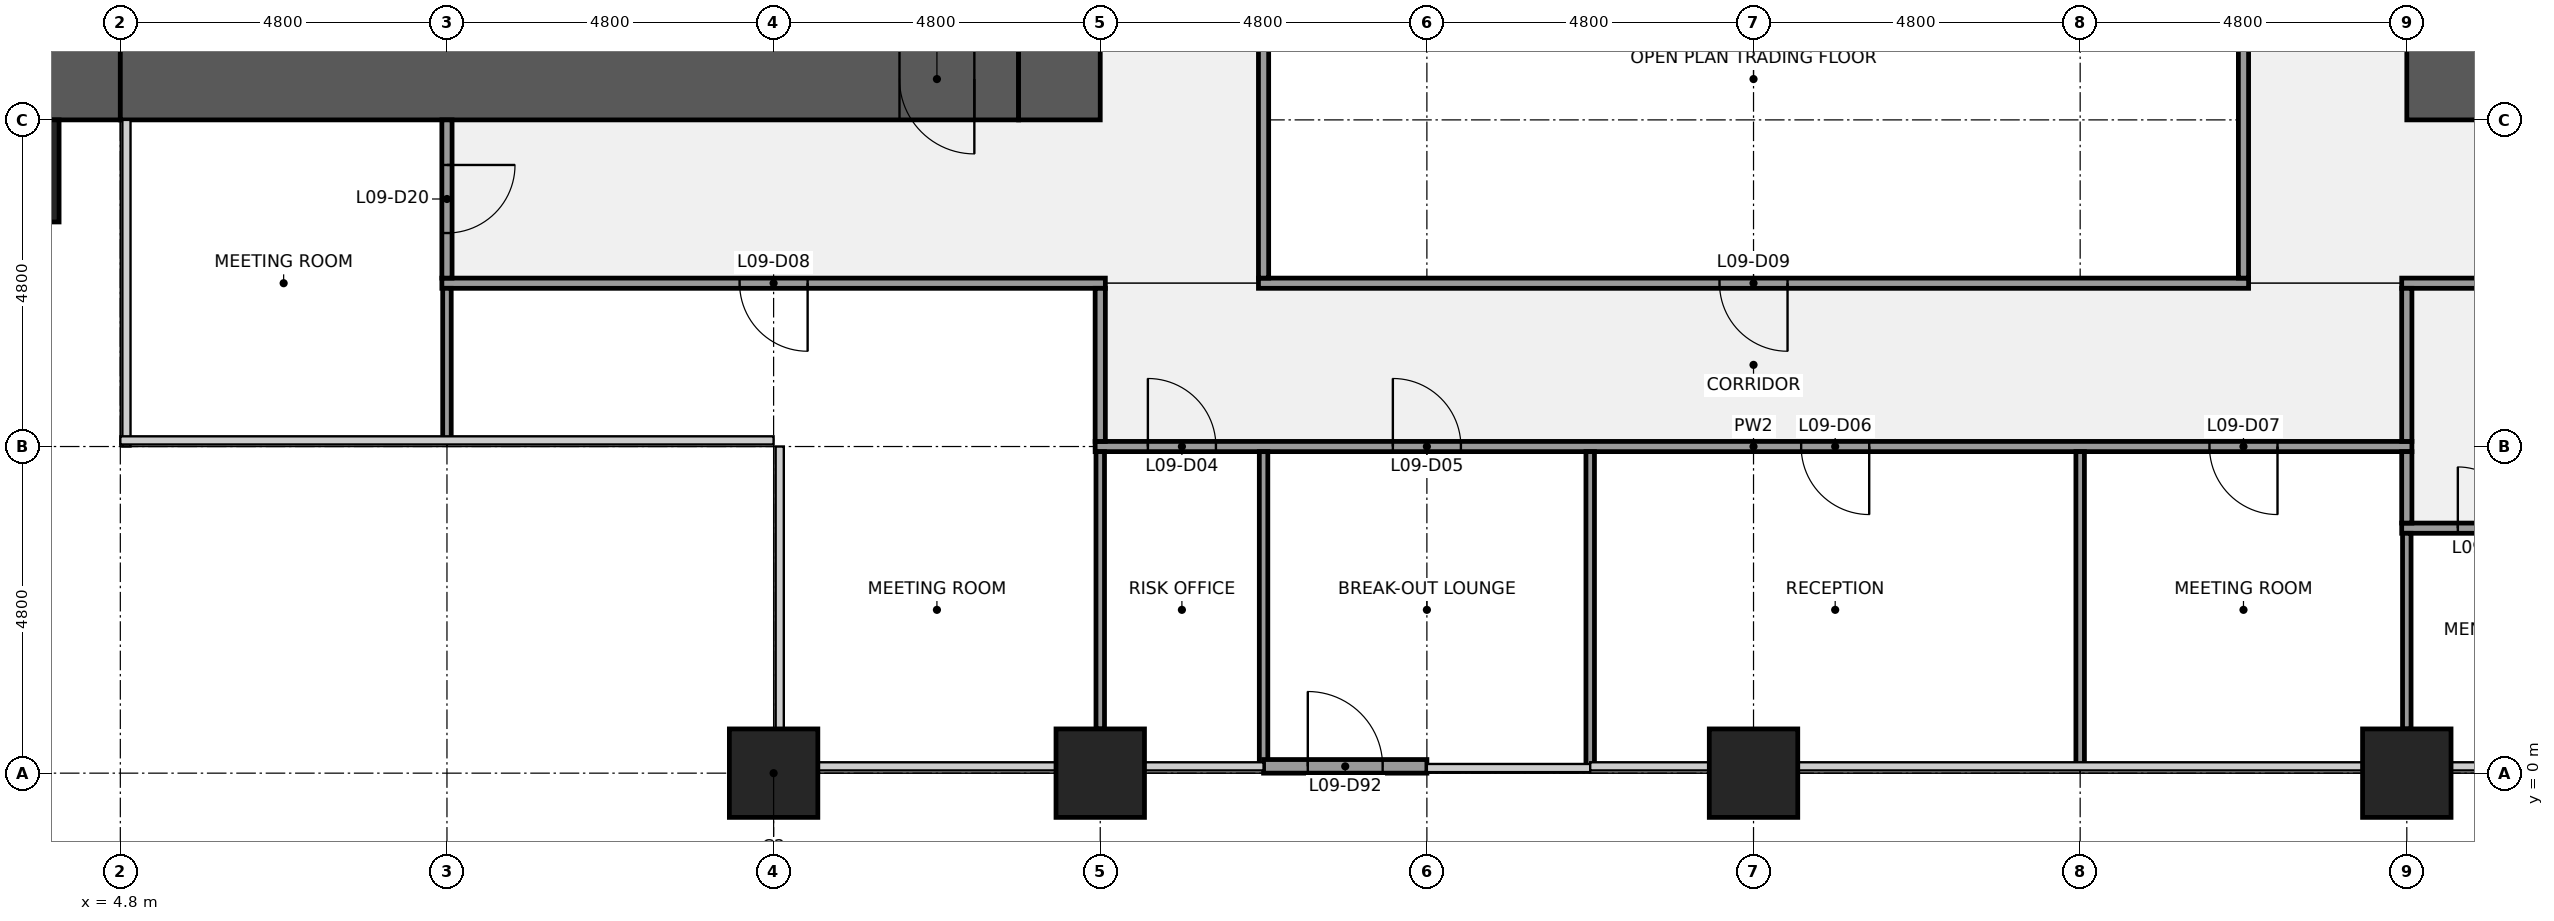
"""IFC4 building model, lengths in metres.
Left out: names, types, materials, properties, quantities, classifications, styles, units other than length and angle.
Written with IfcOpenShell. Run it as: python <this file> out.ifc"""

import sys

from ifc_helpers import new_model, si_unit, direction, frame, frame_2d, origin, origin_2d, place, context, subcontext, project, spatial, rectangle, extrude, element, fill, save


model = new_model("IFC4")
c1 = context("Model", 3, precision=1e-05, world=origin(), true_north=direction((0.0, 1.0)))
c2 = subcontext(c1, "Body", "Model", "MODEL_VIEW")
j1 = project(units=[si_unit("LENGTHUNIT", "METRE"), si_unit("PLANEANGLEUNIT", "RADIAN")], contexts=[c1])
p1 = place(None, origin())
s1 = spatial("IfcSite", under=j1, at=p1, CompositionType="ELEMENT")
p2 = place(p1, origin())
s2 = spatial("IfcBuilding", under=s1, at=p2, CompositionType="ELEMENT")
p3 = place(p2, frame((0.0, 0.0, 47.0)))
s3 = spatial("IfcBuildingStorey", under=s2, at=p3, CompositionType="ELEMENT", Elevation=47.0)
for number, where, z_axis, x_axis in (
    (1, (14.4, 0.0, 0.0), (0.0, 0.0, 1.0), (1.0, 0.0, 0.0)),
    (2, (19.2, 0.0, 0.0), (0.0, 0.0, 1.0), (1.0, 0.0, 0.0)),
    (3, (28.8, 0.0, 0.0), (0.0, 0.0, 1.0), (1.0, 0.0, 0.0)),
    (4, (38.4, 0.0, 0.0), (0.0, 0.0, 1.0), (1.0, 0.0, 0.0)),
):
    element("IfcColumn", number, at=place(p3, frame(where, z_axis=z_axis, x_axis=x_axis)), inside=s3, PredefinedType="COLUMN", context=c2, shape_type="SweptSolid", body=[
        extrude(rectangle(XDim=1.3, YDim=1.3, at=origin_2d()), origin(), (0.0, 0.0, 1.0), 4.0),
    ])
p4 = place(p3, frame((4.8, 10.2, 0.0), z_axis=(0.0, 0.0, 1.0), x_axis=(-1.0, 0.0, 0.0)))
e5 = element("IfcWall", 5, at=p4, inside=s3, PredefinedType="SHEAR", context=c2, shape_type="SweptSolid", body=[
    extrude(rectangle(XDim=3.6, YDim=1.2, at=frame_2d((1.8, 0.0))), origin(), (0.0, 0.0, 1.0), 3.84),
])
p5 = place(p3, frame((18.0, 10.2, 0.0), z_axis=(0.0, 0.0, 1.0), x_axis=(-1.0, 0.0, 0.0)))
e6 = element("IfcWall", 6, at=p5, inside=s3, PredefinedType="SHEAR", context=c2, shape_type="SweptSolid", body=[
    extrude(rectangle(XDim=13.2, YDim=1.2, at=frame_2d((6.6, 0.0))), origin(), (0.0, 0.0, 1.0), 3.84),
])
p6 = place(p5, frame((0.65, 0.0, 0.0)))
e7 = element("IfcOpeningElement", 7, at=p6, cuts=e6, PredefinedType="OPENING", context=c2, shape_type="SweptSolid", body=[
    extrude(rectangle(XDim=1.1, YDim=2.1, at=frame_2d((0.55, 1.05))), frame((0.0, 0.61, 0.0), z_axis=(0.0, -1.0, 0.0), x_axis=(1.0, 0.0, 0.0)), (0.0, 0.0, 1.0), 1.22),
])
p7 = place(p3, frame((18.6, 38.4, 0.0), z_axis=(0.0, 0.0, 1.0), x_axis=(0.0, -1.0, 0.0)))
e8 = element("IfcWall", 8, at=p7, inside=s3, PredefinedType="SHEAR", context=c2, shape_type="SweptSolid", body=[
    extrude(rectangle(XDim=28.8, YDim=1.2, at=frame_2d((14.4, 0.0))), origin(), (0.0, 0.0, 1.0), 3.84),
])
p8 = place(p7, frame((18.3, 0.0, 0.0)))
e9 = element("IfcOpeningElement", 9, at=p8, cuts=e8, PredefinedType="OPENING", context=c2, shape_type="SweptSolid", body=[
    extrude(rectangle(XDim=1.8, YDim=2.1, at=frame_2d((0.9, 1.05))), frame((0.0, 0.61, 0.0), z_axis=(0.0, -1.0, 0.0), x_axis=(1.0, 0.0, 0.0)), (0.0, 0.0, 1.0), 1.22),
])
p9 = place(p7, frame((8.7, 0.0, 0.0)))
e10 = element("IfcOpeningElement", 10, at=p9, cuts=e8, PredefinedType="OPENING", context=c2, shape_type="SweptSolid", body=[
    extrude(rectangle(XDim=1.8, YDim=2.1, at=frame_2d((0.9, 1.05))), frame((0.0, 0.61, 0.0), z_axis=(0.0, -1.0, 0.0), x_axis=(1.0, 0.0, 0.0)), (0.0, 0.0, 1.0), 1.22),
])
p10 = place(p3, frame((39.0, 9.6, 0.0), z_axis=(0.0, 0.0, 1.0), x_axis=(0.0, 1.0, 0.0)))
e11 = element("IfcWall", 11, at=p10, inside=s3, PredefinedType="SHEAR", context=c2, shape_type="SweptSolid", body=[
    extrude(rectangle(XDim=28.8, YDim=1.2, at=frame_2d((14.4, 0.0))), origin(), (0.0, 0.0, 1.0), 3.84),
])
p11 = place(p10, frame((8.7, 0.0, 0.0)))
e12 = element("IfcOpeningElement", 12, at=p11, cuts=e11, PredefinedType="OPENING", context=c2, shape_type="SweptSolid", body=[
    extrude(rectangle(XDim=1.8, YDim=2.1, at=frame_2d((0.9, 1.05))), frame((0.0, 0.61, 0.0), z_axis=(0.0, -1.0, 0.0), x_axis=(1.0, 0.0, 0.0)), (0.0, 0.0, 1.0), 1.22),
])
p12 = place(p10, frame((18.3, 0.0, 0.0)))
e13 = element("IfcOpeningElement", 13, at=p12, cuts=e11, PredefinedType="OPENING", context=c2, shape_type="SweptSolid", body=[
    extrude(rectangle(XDim=1.8, YDim=2.1, at=frame_2d((0.9, 1.05))), frame((0.0, 0.61, 0.0), z_axis=(0.0, -1.0, 0.0), x_axis=(1.0, 0.0, 0.0)), (0.0, 0.0, 1.0), 1.22),
])
p13 = place(p3, frame((38.325, 3.6, 0.0), z_axis=(0.0, 0.0, 1.0), x_axis=(1.0, 0.0, 0.0)))
e14 = element("IfcWall", 14, at=p13, inside=s3, PredefinedType="PARTITIONING", context=c2, shape_type="SweptSolid", body=[
    extrude(rectangle(XDim=7.35, YDim=0.15, at=frame_2d((3.675, 0.0))), origin(), (0.0, 0.0, 1.0), 2.87),
])
p14 = place(p13, frame((0.825, 0.0, 0.0)))
e15 = element("IfcOpeningElement", 15, at=p14, cuts=e14, PredefinedType="OPENING", context=c2, shape_type="SweptSolid", body=[
    extrude(rectangle(XDim=0.9, YDim=2.1, at=frame_2d((0.45, 1.05))), frame((0.0, 0.085, 0.0), z_axis=(0.0, -1.0, 0.0), x_axis=(1.0, 0.0, 0.0)), (0.0, 0.0, 1.0), 0.17),
])
p15 = place(p13, frame((3.225, 0.0, 0.0)))
e16 = element("IfcOpeningElement", 16, at=p15, cuts=e14, PredefinedType="OPENING", context=c2, shape_type="SweptSolid", body=[
    extrude(rectangle(XDim=0.9, YDim=2.1, at=frame_2d((0.45, 1.05))), frame((0.0, 0.085, 0.0), z_axis=(0.0, -1.0, 0.0), x_axis=(1.0, 0.0, 0.0)), (0.0, 0.0, 1.0), 0.17),
])
p16 = place(p13, frame((5.475, 0.0, 0.0)))
e17 = element("IfcOpeningElement", 17, at=p16, cuts=e14, PredefinedType="OPENING", context=c2, shape_type="SweptSolid", body=[
    extrude(rectangle(XDim=1.2, YDim=2.1, at=frame_2d((0.6, 1.05))), frame((0.0, 0.085, 0.0), z_axis=(0.0, -1.0, 0.0), x_axis=(1.0, 0.0, 0.0)), (0.0, 0.0, 1.0), 0.17),
])
p17 = place(p3, frame((19.125, 4.8, 0.0), z_axis=(0.0, 0.0, 1.0), x_axis=(1.0, 0.0, 0.0)))
e18 = element("IfcWall", 18, at=p17, inside=s3, PredefinedType="PARTITIONING", context=c2, shape_type="SweptSolid", body=[
    extrude(rectangle(XDim=19.35, YDim=0.15, at=frame_2d((9.675, 0.0))), origin(), (0.0, 0.0, 1.0), 2.87),
])
p18 = place(p17, frame((0.775, 0.0, 0.0)))
e19 = element("IfcOpeningElement", 19, at=p18, cuts=e18, PredefinedType="OPENING", context=c2, shape_type="SweptSolid", body=[
    extrude(rectangle(XDim=1.0, YDim=2.1, at=frame_2d((0.5, 1.05))), frame((0.0, 0.085, 0.0), z_axis=(0.0, -1.0, 0.0), x_axis=(1.0, 0.0, 0.0)), (0.0, 0.0, 1.0), 0.17),
])
p19 = place(p17, frame((4.375, 0.0, 0.0)))
e20 = element("IfcOpeningElement", 20, at=p19, cuts=e18, PredefinedType="OPENING", context=c2, shape_type="SweptSolid", body=[
    extrude(rectangle(XDim=1.0, YDim=2.1, at=frame_2d((0.5, 1.05))), frame((0.0, 0.085, 0.0), z_axis=(0.0, -1.0, 0.0), x_axis=(1.0, 0.0, 0.0)), (0.0, 0.0, 1.0), 0.17),
])
p20 = place(p17, frame((10.375, 0.0, 0.0)))
e21 = element("IfcOpeningElement", 21, at=p20, cuts=e18, PredefinedType="OPENING", context=c2, shape_type="SweptSolid", body=[
    extrude(rectangle(XDim=1.0, YDim=2.1, at=frame_2d((0.5, 1.05))), frame((0.0, 0.085, 0.0), z_axis=(0.0, -1.0, 0.0), x_axis=(1.0, 0.0, 0.0)), (0.0, 0.0, 1.0), 0.17),
])
p21 = place(p17, frame((16.375, 0.0, 0.0)))
e22 = element("IfcOpeningElement", 22, at=p21, cuts=e18, PredefinedType="OPENING", context=c2, shape_type="SweptSolid", body=[
    extrude(rectangle(XDim=1.0, YDim=2.1, at=frame_2d((0.5, 1.05))), frame((0.0, 0.085, 0.0), z_axis=(0.0, -1.0, 0.0), x_axis=(1.0, 0.0, 0.0)), (0.0, 0.0, 1.0), 0.17),
])
p22 = place(p3, frame((9.525, 7.2, 0.0), z_axis=(0.0, 0.0, 1.0), x_axis=(1.0, 0.0, 0.0)))
e23 = element("IfcWall", 23, at=p22, inside=s3, PredefinedType="PARTITIONING", context=c2, shape_type="SweptSolid", body=[
    extrude(rectangle(XDim=9.75, YDim=0.15, at=frame_2d((4.875, 0.0))), origin(), (0.0, 0.0, 1.0), 2.87),
])
p23 = place(p22, frame((4.375, 0.0, 0.0)))
e24 = element("IfcOpeningElement", 24, at=p23, cuts=e23, PredefinedType="OPENING", context=c2, shape_type="SweptSolid", body=[
    extrude(rectangle(XDim=1.0, YDim=2.1, at=frame_2d((0.5, 1.05))), frame((0.0, 0.085, 0.0), z_axis=(0.0, -1.0, 0.0), x_axis=(1.0, 0.0, 0.0)), (0.0, 0.0, 1.0), 0.17),
])
p24 = place(p3, frame((21.525, 7.2, 0.0), z_axis=(0.0, 0.0, 1.0), x_axis=(1.0, 0.0, 0.0)))
e25 = element("IfcWall", 25, at=p24, inside=s3, PredefinedType="PARTITIONING", context=c2, shape_type="SweptSolid", body=[
    extrude(rectangle(XDim=14.55, YDim=0.15, at=frame_2d((7.275, 0.0))), origin(), (0.0, 0.0, 1.0), 2.87),
])
p25 = place(p24, frame((6.775, 0.0, 0.0)))
e26 = element("IfcOpeningElement", 26, at=p25, cuts=e25, PredefinedType="OPENING", context=c2, shape_type="SweptSolid", body=[
    extrude(rectangle(XDim=1.0, YDim=2.1, at=frame_2d((0.5, 1.05))), frame((0.0, 0.085, 0.0), z_axis=(0.0, -1.0, 0.0), x_axis=(1.0, 0.0, 0.0)), (0.0, 0.0, 1.0), 0.17),
])
p26 = place(p3, frame((38.325, 7.2, 0.0), z_axis=(0.0, 0.0, 1.0), x_axis=(1.0, 0.0, 0.0)))
e27 = element("IfcWall", 27, at=p26, inside=s3, PredefinedType="PARTITIONING", context=c2, shape_type="SweptSolid", body=[
    extrude(rectangle(XDim=9.75, YDim=0.15, at=frame_2d((4.875, 0.0))), origin(), (0.0, 0.0, 1.0), 2.87),
])
p27 = place(p26, frame((3.175, 0.0, 0.0)))
e28 = element("IfcOpeningElement", 28, at=p27, cuts=e27, PredefinedType="OPENING", context=c2, shape_type="SweptSolid", body=[
    extrude(rectangle(XDim=1.0, YDim=2.1, at=frame_2d((0.5, 1.05))), frame((0.0, 0.085, 0.0), z_axis=(0.0, -1.0, 0.0), x_axis=(1.0, 0.0, 0.0)), (0.0, 0.0, 1.0), 0.17),
])
p28 = place(p26, frame((7.975, 0.0, 0.0)))
e29 = element("IfcOpeningElement", 29, at=p28, cuts=e27, PredefinedType="OPENING", context=c2, shape_type="SweptSolid", body=[
    extrude(rectangle(XDim=1.0, YDim=2.1, at=frame_2d((0.5, 1.05))), frame((0.0, 0.085, 0.0), z_axis=(0.0, -1.0, 0.0), x_axis=(1.0, 0.0, 0.0)), (0.0, 0.0, 1.0), 0.17),
])
p29 = place(p3, frame((9.6, 4.9, 0.0), z_axis=(0.0, 0.0, 1.0), x_axis=(0.0, 1.0, 0.0)))
e30 = element("IfcWall", 30, at=p29, inside=s3, PredefinedType="PARTITIONING", context=c2, shape_type="SweptSolid", body=[
    extrude(rectangle(XDim=2.225, YDim=0.125, at=frame_2d((1.113, 0.0))), origin(), (0.0, 0.0, 1.0), 2.87),
])
p30 = place(p3, frame((9.6, 7.275, 0.0), z_axis=(0.0, 0.0, 1.0), x_axis=(0.0, 1.0, 0.0)))
e31 = element("IfcWall", 31, at=p30, inside=s3, PredefinedType="PARTITIONING", context=c2, shape_type="SweptSolid", body=[
    extrude(rectangle(XDim=2.325, YDim=0.15, at=frame_2d((1.163, 0.0))), origin(), (0.0, 0.0, 1.0), 2.87),
])
p31 = place(p30, frame((0.663, 0.0, 0.0)))
e32 = element("IfcOpeningElement", 32, at=p31, cuts=e31, PredefinedType="OPENING", context=c2, shape_type="SweptSolid", body=[
    extrude(rectangle(XDim=1.0, YDim=2.1, at=frame_2d((0.5, 1.05))), frame((0.0, 0.085, 0.0), z_axis=(0.0, -1.0, 0.0), x_axis=(1.0, 0.0, 0.0)), (0.0, 0.0, 1.0), 0.17),
])
p32 = place(p3, frame((19.2, 0.65, 0.0), z_axis=(0.0, 0.0, 1.0), x_axis=(0.0, 1.0, 0.0)))
e33 = element("IfcWall", 33, at=p32, inside=s3, PredefinedType="PARTITIONING", context=c2, shape_type="SweptSolid", body=[
    extrude(rectangle(XDim=4.075, YDim=0.125, at=frame_2d((2.038, 0.0))), origin(), (0.0, 0.0, 1.0), 2.87),
])
p33 = place(p3, frame((19.2, 4.875, 0.0), z_axis=(0.0, 0.0, 1.0), x_axis=(0.0, 1.0, 0.0)))
e34 = element("IfcWall", 34, at=p33, inside=s3, PredefinedType="PARTITIONING", context=c2, shape_type="SweptSolid", body=[
    extrude(rectangle(XDim=2.25, YDim=0.15, at=frame_2d((1.125, 0.0))), origin(), (0.0, 0.0, 1.0), 2.87),
])
p34 = place(p3, frame((21.6, 0.1, 0.0), z_axis=(0.0, 0.0, 1.0), x_axis=(0.0, 1.0, 0.0)))
e35 = element("IfcWall", 35, at=p34, inside=s3, PredefinedType="PARTITIONING", context=c2, shape_type="SweptSolid", body=[
    extrude(rectangle(XDim=4.625, YDim=0.125, at=frame_2d((2.312, 0.0))), origin(), (0.0, 0.0, 1.0), 2.87),
])
p35 = place(p3, frame((21.6, 7.275, 0.0), z_axis=(0.0, 0.0, 1.0), x_axis=(0.0, 1.0, 0.0)))
e36 = element("IfcWall", 36, at=p35, inside=s3, PredefinedType="PARTITIONING", context=c2, shape_type="SweptSolid", body=[
    extrude(rectangle(XDim=5.863, YDim=0.15, at=frame_2d((2.931, 0.0))), origin(), (0.0, 0.0, 1.0), 2.87),
])
for number, where, z_axis, x_axis in (
    (37, (26.4, 0.1, 0.0), (0.0, 0.0, 1.0), (0.0, 1.0, 0.0)),
    (38, (33.6, 0.1, 0.0), (0.0, 0.0, 1.0), (0.0, 1.0, 0.0)),
):
    element("IfcWall", number, at=place(p3, frame(where, z_axis=z_axis, x_axis=x_axis)), inside=s3, PredefinedType="PARTITIONING", context=c2, shape_type="SweptSolid", body=[
        extrude(rectangle(XDim=4.625, YDim=0.125, at=frame_2d((2.312, 0.0))), origin(), (0.0, 0.0, 1.0), 2.87),
    ])
p36 = place(p3, frame((36.0, 7.275, 0.0), z_axis=(0.0, 0.0, 1.0), x_axis=(0.0, 1.0, 0.0)))
e39 = element("IfcWall", 39, at=p36, inside=s3, PredefinedType="PARTITIONING", context=c2, shape_type="SweptSolid", body=[
    extrude(rectangle(XDim=5.863, YDim=0.15, at=frame_2d((2.931, 0.0))), origin(), (0.0, 0.0, 1.0), 2.87),
])
p37 = place(p3, frame((38.4, 0.65, 0.0), z_axis=(0.0, 0.0, 1.0), x_axis=(0.0, 1.0, 0.0)))
e40 = element("IfcWall", 40, at=p37, inside=s3, PredefinedType="PARTITIONING", context=c2, shape_type="SweptSolid", body=[
    extrude(rectangle(XDim=2.875, YDim=0.125, at=frame_2d((1.438, 0.0))), origin(), (0.0, 0.0, 1.0), 2.87),
])
p38 = place(p3, frame((38.4, 3.675, 0.0), z_axis=(0.0, 0.0, 1.0), x_axis=(0.0, 1.0, 0.0)))
e41 = element("IfcWall", 41, at=p38, inside=s3, PredefinedType="PARTITIONING", context=c2, shape_type="SweptSolid", body=[
    extrude(rectangle(XDim=1.05, YDim=0.15, at=frame_2d((0.525, 0.0))), origin(), (0.0, 0.0, 1.0), 2.87),
])
p39 = place(p3, frame((38.4, 4.875, 0.0), z_axis=(0.0, 0.0, 1.0), x_axis=(0.0, 1.0, 0.0)))
e42 = element("IfcWall", 42, at=p39, inside=s3, PredefinedType="PARTITIONING", context=c2, shape_type="SweptSolid", body=[
    extrude(rectangle(XDim=2.25, YDim=0.15, at=frame_2d((1.125, 0.0))), origin(), (0.0, 0.0, 1.0), 2.87),
])
p40 = place(p3, frame((2.4, 8.85, 0.0), z_axis=(0.0, 0.0, 1.0), x_axis=(1.0, 0.0, 0.0)))
e43 = element("IfcColumn", 43, at=p40, inside=s3, PredefinedType="PILASTER", context=c2, shape_type="SweptSolid", body=[
    extrude(rectangle(XDim=3.0, YDim=1.5, at=origin_2d()), origin(), (0.0, 0.0, 1.0), 4.0),
])
p41 = place(p3, frame((21.6, 0.1, 0.0), z_axis=(0.0, 0.0, 1.0), x_axis=(1.0, 0.0, 0.0)))
e44 = element("IfcWall", 44, at=p41, inside=s3, PredefinedType="SOLIDWALL", context=c2, shape_type="SweptSolid", body=[
    extrude(rectangle(XDim=2.4, YDim=0.2, at=frame_2d((1.2, 0.0))), origin(), (0.0, 0.0, 1.0), 3.314),
])
p42 = place(p41, frame((0.65, 0.0, 0.0)))
e45 = element("IfcOpeningElement", 45, at=p42, cuts=e44, PredefinedType="OPENING", context=c2, shape_type="SweptSolid", body=[
    extrude(rectangle(XDim=1.1, YDim=2.1, at=frame_2d((0.55, 1.05))), frame((0.0, 0.11, 0.0), z_axis=(0.0, -1.0, 0.0), x_axis=(1.0, 0.0, 0.0)), (0.0, 0.0, 1.0), 0.22),
])
for number, where, z_axis, x_axis in (
    (46, (14.4, -1.075, 0.0), (0.0, 0.0, 1.0), (1.0, 0.0, 0.0)),
    (47, (19.2, -1.075, 0.0), (0.0, 0.0, 1.0), (1.0, 0.0, 0.0)),
    (48, (38.4, -1.075, 0.0), (0.0, 0.0, 1.0), (1.0, 0.0, 0.0)),
):
    element("IfcColumn", number, at=place(p3, frame(where, z_axis=z_axis, x_axis=x_axis)), inside=s3, PredefinedType="PILASTER", context=c2, shape_type="SweptSolid", body=[
        extrude(rectangle(XDim=4.2, YDim=0.85, at=origin_2d()), origin(), (0.0, 0.0, 1.0), 4.0),
    ])
p43 = place(p6, origin())
e49 = element("IfcDoor", 49, at=p43, inside=s3, OperationType="SINGLE_SWING_LEFT", PredefinedType="DOOR", context=c2, shape_type="SweptSolid", body=[
    extrude(rectangle(XDim=1.1, YDim=2.1, at=frame_2d((0.55, 1.05))), frame((0.0, 0.025, 0.0), z_axis=(0.0, -1.0, 0.0), x_axis=(1.0, 0.0, 0.0)), (0.0, 0.0, 1.0), 0.05),
])
fill(e7, e49)
p44 = place(p14, origin())
e50 = element("IfcDoor", 50, at=p44, inside=s3, OperationType="SINGLE_SWING_LEFT", PredefinedType="DOOR", context=c2, shape_type="SweptSolid", body=[
    extrude(rectangle(XDim=0.9, YDim=2.1, at=frame_2d((0.45, 1.05))), frame((0.0, 0.025, 0.0), z_axis=(0.0, -1.0, 0.0), x_axis=(1.0, 0.0, 0.0)), (0.0, 0.0, 1.0), 0.05),
])
fill(e15, e50)
p45 = place(p18, origin())
e51 = element("IfcDoor", 51, at=p45, inside=s3, OperationType="SINGLE_SWING_LEFT", PredefinedType="DOOR", context=c2, shape_type="SweptSolid", body=[
    extrude(rectangle(XDim=1.0, YDim=2.1, at=frame_2d((0.5, 1.05))), frame((0.0, 0.025, 0.0), z_axis=(0.0, -1.0, 0.0), x_axis=(1.0, 0.0, 0.0)), (0.0, 0.0, 1.0), 0.05),
])
fill(e19, e51)
p46 = place(p19, origin())
e52 = element("IfcDoor", 52, at=p46, inside=s3, OperationType="SINGLE_SWING_LEFT", PredefinedType="DOOR", context=c2, shape_type="SweptSolid", body=[
    extrude(rectangle(XDim=1.0, YDim=2.1, at=frame_2d((0.5, 1.05))), frame((0.0, 0.025, 0.0), z_axis=(0.0, -1.0, 0.0), x_axis=(1.0, 0.0, 0.0)), (0.0, 0.0, 1.0), 0.05),
])
fill(e20, e52)
p47 = place(p20, origin())
e53 = element("IfcDoor", 53, at=p47, inside=s3, OperationType="SINGLE_SWING_RIGHT", PredefinedType="DOOR", context=c2, shape_type="SweptSolid", body=[
    extrude(rectangle(XDim=1.0, YDim=2.1, at=frame_2d((0.5, 1.05))), frame((0.0, 0.025, 0.0), z_axis=(0.0, -1.0, 0.0), x_axis=(1.0, 0.0, 0.0)), (0.0, 0.0, 1.0), 0.05),
])
fill(e21, e53)
p48 = place(p21, origin())
e54 = element("IfcDoor", 54, at=p48, inside=s3, OperationType="SINGLE_SWING_RIGHT", PredefinedType="DOOR", context=c2, shape_type="SweptSolid", body=[
    extrude(rectangle(XDim=1.0, YDim=2.1, at=frame_2d((0.5, 1.05))), frame((0.0, 0.025, 0.0), z_axis=(0.0, -1.0, 0.0), x_axis=(1.0, 0.0, 0.0)), (0.0, 0.0, 1.0), 0.05),
])
fill(e22, e54)
p49 = place(p23, origin())
e55 = element("IfcDoor", 55, at=p49, inside=s3, OperationType="SINGLE_SWING_RIGHT", PredefinedType="DOOR", context=c2, shape_type="SweptSolid", body=[
    extrude(rectangle(XDim=1.0, YDim=2.1, at=frame_2d((0.5, 1.05))), frame((0.0, 0.025, 0.0), z_axis=(0.0, -1.0, 0.0), x_axis=(1.0, 0.0, 0.0)), (0.0, 0.0, 1.0), 0.05),
])
fill(e24, e55)
p50 = place(p25, origin())
e56 = element("IfcDoor", 56, at=p50, inside=s3, OperationType="SINGLE_SWING_RIGHT", PredefinedType="DOOR", context=c2, shape_type="SweptSolid", body=[
    extrude(rectangle(XDim=1.0, YDim=2.1, at=frame_2d((0.5, 1.05))), frame((0.0, 0.025, 0.0), z_axis=(0.0, -1.0, 0.0), x_axis=(1.0, 0.0, 0.0)), (0.0, 0.0, 1.0), 0.05),
])
fill(e26, e56)
p51 = place(p31, origin())
e57 = element("IfcDoor", 57, at=p51, inside=s3, OperationType="SINGLE_SWING_RIGHT", PredefinedType="DOOR", context=c2, shape_type="SweptSolid", body=[
    extrude(rectangle(XDim=1.0, YDim=2.1, at=frame_2d((0.5, 1.05))), frame((0.0, 0.025, 0.0), z_axis=(0.0, -1.0, 0.0), x_axis=(1.0, 0.0, 0.0)), (0.0, 0.0, 1.0), 0.05),
])
fill(e32, e57)
p52 = place(p42, origin())
e58 = element("IfcDoor", 58, at=p52, inside=s3, OperationType="SINGLE_SWING_LEFT", PredefinedType="DOOR", context=c2, shape_type="SweptSolid", body=[
    extrude(rectangle(XDim=1.1, YDim=2.1, at=frame_2d((0.55, 1.05))), frame((0.0, 0.025, 0.0), z_axis=(0.0, -1.0, 0.0), x_axis=(1.0, 0.0, 0.0)), (0.0, 0.0, 1.0), 0.05),
])
fill(e45, e58)
save(model, sys.argv[1])
